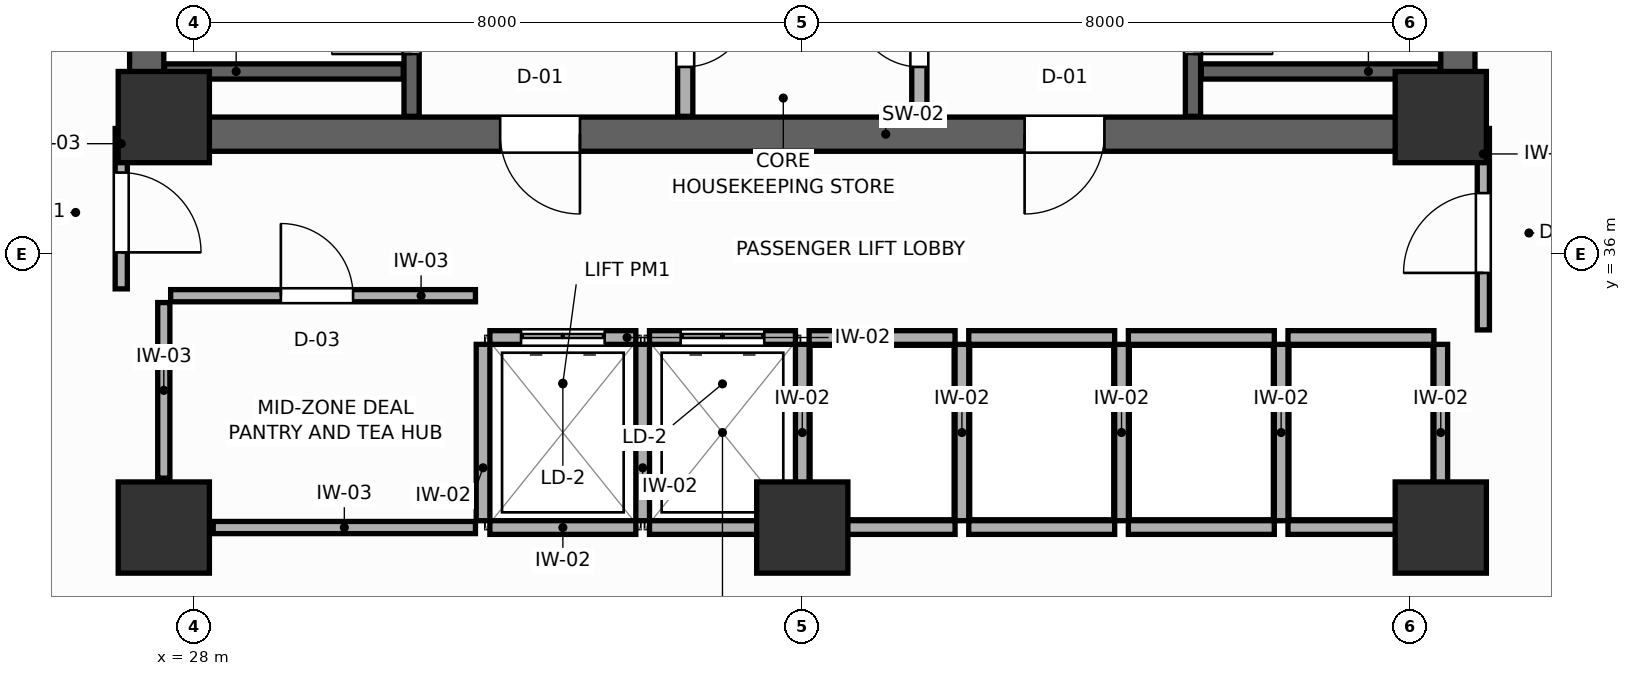
"""IFC4 building model, lengths in metres.
Left out: names, types, materials, properties, quantities, classifications, styles, units other than length and angle.
Written with IfcOpenShell. Run it as: python <this file> out.ifc"""

import sys

from ifc_helpers import new_model, si_unit, direction, frame, frame_2d, origin, origin_2d, place, context, subcontext, project, spatial, rectangle, extrude, source, transform, mapped, element, fill, save


model = new_model("IFC4")
c1 = context("Model", 3, precision=1e-05, world=origin(), true_north=direction((0.0, 1.0)))
c2 = subcontext(c1, "Body", "Model", "MODEL_VIEW")
j1 = project(units=[si_unit("LENGTHUNIT", "METRE"), si_unit("PLANEANGLEUNIT", "RADIAN")], contexts=[c1])
p1 = place(None, origin())
s1 = spatial("IfcSite", under=j1, at=p1, CompositionType="ELEMENT")
p2 = place(p1, origin())
s2 = spatial("IfcBuilding", under=s1, at=p2, CompositionType="ELEMENT")
p3 = place(p2, frame((0.0, 0.0, 143.4)))
s3 = spatial("IfcBuildingStorey", under=s2, at=p3, CompositionType="ELEMENT", Elevation=143.4)
p4 = place(p3, frame((27.15, 37.575, 0.0), z_axis=(0.0, 0.0, 1.0), x_axis=(1.0, 0.0, 0.0)))
e1 = element("IfcWall", 1, at=p4, inside=s3, PredefinedType="SHEAR", context=c2, shape_type="SweptSolid", body=[
    extrude(rectangle(XDim=17.7, YDim=0.45, at=frame_2d((8.85, 0.0))), origin(), (0.0, 0.0, 1.0), 3.6),
])
p5 = place(p4, frame((4.875, 0.0, 0.0)))
e2 = element("IfcOpeningElement", 2, at=p5, cuts=e1, PredefinedType="OPENING", context=c2, shape_type="SweptSolid", body=[
    extrude(rectangle(XDim=1.05, YDim=2.1, at=frame_2d((0.525, 1.05))), frame((0.0, 0.235, 0.0), z_axis=(0.0, -1.0, 0.0), x_axis=(1.0, 0.0, 0.0)), (0.0, 0.0, 1.0), 0.47),
])
p6 = place(p4, frame((11.775, 0.0, 0.0)))
e3 = element("IfcOpeningElement", 3, at=p6, cuts=e1, PredefinedType="OPENING", context=c2, shape_type="SweptSolid", body=[
    extrude(rectangle(XDim=1.05, YDim=2.1, at=frame_2d((0.525, 1.05))), frame((0.0, 0.235, 0.0), z_axis=(0.0, -1.0, 0.0), x_axis=(1.0, 0.0, 0.0)), (0.0, 0.0, 1.0), 0.47),
])
for number, where, z_axis, x_axis in (
    (4, (27.375, 37.8, 0.0), (0.0, 0.0, 1.0), (0.0, 1.0, 0.0)),
    (5, (44.625, 37.8, 0.0), (0.0, 0.0, 1.0), (0.0, 1.0, 0.0)),
):
    element("IfcWall", number, at=place(p3, frame(where, z_axis=z_axis, x_axis=x_axis)), inside=s3, PredefinedType="SHEAR", context=c2, shape_type="SweptSolid", body=[
        extrude(rectangle(XDim=9.0, YDim=0.45, at=frame_2d((4.5, 0.0))), origin(), (0.0, 0.0, 1.0), 3.6),
    ])
m1 = source(origin(), c2, "Body", "SweptSolid", [
    extrude(rectangle(XDim=1.2, YDim=1.2, at=origin_2d()), origin(), (0.0, 0.0, 1.0), 3.6),
])
for number, where, z_axis, x_axis in (
    (6, (27.6, 37.8, 0.0), (0.0, 0.0, 1.0), (1.0, 0.0, 0.0)),
    (7, (44.4, 37.8, 0.0), (0.0, 0.0, 1.0), (1.0, 0.0, 0.0)),
    (8, (27.6, 32.4, 0.0), (0.0, 0.0, 1.0), (1.0, 0.0, 0.0)),
    (9, (44.4, 32.4, 0.0), (0.0, 0.0, 1.0), (1.0, 0.0, 0.0)),
    (10, (36.0, 32.4, 0.0), (0.0, 0.0, 1.0), (1.0, 0.0, 0.0)),
):
    element("IfcColumn", number, at=place(p3, frame(where, z_axis=z_axis, x_axis=x_axis)), inside=s3, PredefinedType="COLUMN", context=c2, shape_type="MappedRepresentation", body=[
        mapped(m1, transform((0.0, 0.0, 0.0), scale=1.0)),
    ])
p7 = place(p3, frame((30.86, 37.81, 0.0), z_axis=(0.0, 0.0, 1.0), x_axis=(0.0, 1.0, 0.0)))
e11 = element("IfcWall", 11, at=p7, inside=s3, PredefinedType="SHEAR", context=c2, shape_type="SweptSolid", body=[
    extrude(rectangle(XDim=8.98, YDim=0.2, at=frame_2d((4.49, 0.0))), origin(), (0.0, 0.0, 1.0), 3.6),
])
p8 = place(p7, frame((0.82, 0.0, 0.0)))
e12 = element("IfcOpeningElement", 12, at=p8, cuts=e11, PredefinedType="OPENING", context=c2, shape_type="SweptSolid", body=[
    extrude(rectangle(XDim=1.05, YDim=2.1, at=frame_2d((0.525, 1.05))), frame((0.0, 0.11, 0.0), z_axis=(0.0, -1.0, 0.0), x_axis=(1.0, 0.0, 0.0)), (0.0, 0.0, 1.0), 0.22),
])
p9 = place(p3, frame((27.61, 38.4, 0.0), z_axis=(0.0, 0.0, 1.0), x_axis=(1.0, 0.0, 0.0)))
e13 = element("IfcWall", 13, at=p9, inside=s3, PredefinedType="SHEAR", context=c2, shape_type="SweptSolid", body=[
    extrude(rectangle(XDim=3.14, YDim=0.2, at=frame_2d((1.57, 0.0))), origin(), (0.0, 0.0, 1.0), 3.6),
])
p10 = place(p3, frame((41.14, 37.81, 0.0), z_axis=(0.0, 0.0, 1.0), x_axis=(0.0, 1.0, 0.0)))
e14 = element("IfcWall", 14, at=p10, inside=s3, PredefinedType="SHEAR", context=c2, shape_type="SweptSolid", body=[
    extrude(rectangle(XDim=8.98, YDim=0.2, at=frame_2d((4.49, 0.0))), origin(), (0.0, 0.0, 1.0), 3.6),
])
p11 = place(p10, frame((0.82, 0.0, 0.0)))
e15 = element("IfcOpeningElement", 15, at=p11, cuts=e14, PredefinedType="OPENING", context=c2, shape_type="SweptSolid", body=[
    extrude(rectangle(XDim=1.05, YDim=2.1, at=frame_2d((0.525, 1.05))), frame((0.0, 0.11, 0.0), z_axis=(0.0, -1.0, 0.0), x_axis=(1.0, 0.0, 0.0)), (0.0, 0.0, 1.0), 0.22),
])
p12 = place(p3, frame((41.25, 38.4, 0.0), z_axis=(0.0, 0.0, 1.0), x_axis=(1.0, 0.0, 0.0)))
e16 = element("IfcWall", 16, at=p12, inside=s3, PredefinedType="SHEAR", context=c2, shape_type="SweptSolid", body=[
    extrude(rectangle(XDim=3.14, YDim=0.2, at=frame_2d((1.57, 0.0))), origin(), (0.0, 0.0, 1.0), 3.6),
])
p13 = place(p3, frame((34.46, 37.81, 0.0), z_axis=(0.0, 0.0, 1.0), x_axis=(0.0, 1.0, 0.0)))
e17 = element("IfcWall", 17, at=p13, inside=s3, PredefinedType="PARTITIONING", context=c2, shape_type="SweptSolid", body=[
    extrude(rectangle(XDim=8.98, YDim=0.2, at=frame_2d((4.49, 0.0))), origin(), (0.0, 0.0, 1.0), 3.4),
])
p14 = place(p13, frame((0.65, 0.0, 0.0)))
e18 = element("IfcOpeningElement", 18, at=p14, cuts=e17, PredefinedType="OPENING", context=c2, shape_type="SweptSolid", body=[
    extrude(rectangle(XDim=0.85, YDim=2.05, at=frame_2d((0.425, 1.025))), frame((0.0, 0.11, 0.0), z_axis=(0.0, -1.0, 0.0), x_axis=(1.0, 0.0, 0.0)), (0.0, 0.0, 1.0), 0.22),
])
p15 = place(p3, frame((37.54, 37.81, 0.0), z_axis=(0.0, 0.0, 1.0), x_axis=(0.0, 1.0, 0.0)))
e19 = element("IfcWall", 19, at=p15, inside=s3, PredefinedType="PARTITIONING", context=c2, shape_type="SweptSolid", body=[
    extrude(rectangle(XDim=8.98, YDim=0.2, at=frame_2d((4.49, 0.0))), origin(), (0.0, 0.0, 1.0), 3.4),
])
p16 = place(p15, frame((0.65, 0.0, 0.0)))
e20 = element("IfcOpeningElement", 20, at=p16, cuts=e19, PredefinedType="OPENING", context=c2, shape_type="SweptSolid", body=[
    extrude(rectangle(XDim=0.85, YDim=2.05, at=frame_2d((0.425, 1.025))), frame((0.0, 0.11, 0.0), z_axis=(0.0, -1.0, 0.0), x_axis=(1.0, 0.0, 0.0)), (0.0, 0.0, 1.0), 0.22),
])
p17 = place(p3, frame((31.89, 34.9, 0.0), z_axis=(0.0, 0.0, 1.0), x_axis=(1.0, 0.0, 0.0)))
e21 = element("IfcWall", 21, at=p17, inside=s3, PredefinedType="PARTITIONING", context=c2, shape_type="SweptSolid", body=[
    extrude(rectangle(XDim=1.92, YDim=0.18, at=frame_2d((0.96, 0.0))), origin(), (0.0, 0.0, 1.0), 3.4),
])
p18 = place(p17, frame((0.41, 0.0, 0.0)))
e22 = element("IfcOpeningElement", 22, at=p18, cuts=e21, PredefinedType="OPENING", context=c2, shape_type="SweptSolid", body=[
    extrude(rectangle(XDim=1.1, YDim=2.1, at=frame_2d((0.55, 1.05))), frame((0.0, 0.1, 0.0), z_axis=(0.0, -1.0, 0.0), x_axis=(1.0, 0.0, 0.0)), (0.0, 0.0, 1.0), 0.2),
])
p19 = place(p3, frame((31.89, 32.4, 0.0), z_axis=(0.0, 0.0, 1.0), x_axis=(1.0, 0.0, 0.0)))
e23 = element("IfcWall", 23, at=p19, inside=s3, PredefinedType="PARTITIONING", context=c2, shape_type="SweptSolid", body=[
    extrude(rectangle(XDim=1.92, YDim=0.18, at=frame_2d((0.96, 0.0))), origin(), (0.0, 0.0, 1.0), 2.16),
])
p20 = place(p3, frame((31.8, 32.49, 0.0), z_axis=(0.0, 0.0, 1.0), x_axis=(0.0, 1.0, 0.0)))
e24 = element("IfcWall", 24, at=p20, inside=s3, PredefinedType="PARTITIONING", context=c2, shape_type="SweptSolid", body=[
    extrude(rectangle(XDim=2.32, YDim=0.18, at=frame_2d((1.16, 0.0))), origin(), (0.0, 0.0, 1.0), 3.4),
])
p21 = place(p3, frame((33.99, 34.9, 0.0), z_axis=(0.0, 0.0, 1.0), x_axis=(1.0, 0.0, 0.0)))
e25 = element("IfcWall", 25, at=p21, inside=s3, PredefinedType="PARTITIONING", context=c2, shape_type="SweptSolid", body=[
    extrude(rectangle(XDim=1.92, YDim=0.18, at=frame_2d((0.96, 0.0))), origin(), (0.0, 0.0, 1.0), 3.4),
])
p22 = place(p21, frame((0.41, 0.0, 0.0)))
e26 = element("IfcOpeningElement", 26, at=p22, cuts=e25, PredefinedType="OPENING", context=c2, shape_type="SweptSolid", body=[
    extrude(rectangle(XDim=1.1, YDim=2.1, at=frame_2d((0.55, 1.05))), frame((0.0, 0.1, 0.0), z_axis=(0.0, -1.0, 0.0), x_axis=(1.0, 0.0, 0.0)), (0.0, 0.0, 1.0), 0.2),
])
p23 = place(p3, frame((33.99, 32.4, 0.0), z_axis=(0.0, 0.0, 1.0), x_axis=(1.0, 0.0, 0.0)))
e27 = element("IfcWall", 27, at=p23, inside=s3, PredefinedType="PARTITIONING", context=c2, shape_type="SweptSolid", body=[
    extrude(rectangle(XDim=1.92, YDim=0.18, at=frame_2d((0.96, 0.0))), origin(), (0.0, 0.0, 1.0), 2.16),
])
p24 = place(p3, frame((33.9, 32.49, 0.0), z_axis=(0.0, 0.0, 1.0), x_axis=(0.0, 1.0, 0.0)))
e28 = element("IfcWall", 28, at=p24, inside=s3, PredefinedType="PARTITIONING", context=c2, shape_type="SweptSolid", body=[
    extrude(rectangle(XDim=2.32, YDim=0.18, at=frame_2d((1.16, 0.0))), origin(), (0.0, 0.0, 1.0), 3.4),
])
p25 = place(p3, frame((36.09, 34.9, 0.0), z_axis=(0.0, 0.0, 1.0), x_axis=(1.0, 0.0, 0.0)))
e29 = element("IfcWall", 29, at=p25, inside=s3, PredefinedType="PARTITIONING", context=c2, shape_type="SweptSolid", body=[
    extrude(rectangle(XDim=1.92, YDim=0.18, at=frame_2d((0.96, 0.0))), origin(), (0.0, 0.0, 1.0), 3.4),
])
p26 = place(p3, frame((36.09, 32.4, 0.0), z_axis=(0.0, 0.0, 1.0), x_axis=(1.0, 0.0, 0.0)))
e30 = element("IfcWall", 30, at=p26, inside=s3, PredefinedType="PARTITIONING", context=c2, shape_type="SweptSolid", body=[
    extrude(rectangle(XDim=1.92, YDim=0.18, at=frame_2d((0.96, 0.0))), origin(), (0.0, 0.0, 1.0), 2.16),
])
p27 = place(p3, frame((36.0, 32.49, 0.0), z_axis=(0.0, 0.0, 1.0), x_axis=(0.0, 1.0, 0.0)))
e31 = element("IfcWall", 31, at=p27, inside=s3, PredefinedType="PARTITIONING", context=c2, shape_type="SweptSolid", body=[
    extrude(rectangle(XDim=2.32, YDim=0.18, at=frame_2d((1.16, 0.0))), origin(), (0.0, 0.0, 1.0), 3.4),
])
p28 = place(p3, frame((38.19, 34.9, 0.0), z_axis=(0.0, 0.0, 1.0), x_axis=(1.0, 0.0, 0.0)))
e32 = element("IfcWall", 32, at=p28, inside=s3, PredefinedType="PARTITIONING", context=c2, shape_type="SweptSolid", body=[
    extrude(rectangle(XDim=1.92, YDim=0.18, at=frame_2d((0.96, 0.0))), origin(), (0.0, 0.0, 1.0), 3.4),
])
p29 = place(p3, frame((38.19, 32.4, 0.0), z_axis=(0.0, 0.0, 1.0), x_axis=(1.0, 0.0, 0.0)))
e33 = element("IfcWall", 33, at=p29, inside=s3, PredefinedType="PARTITIONING", context=c2, shape_type="SweptSolid", body=[
    extrude(rectangle(XDim=1.92, YDim=0.18, at=frame_2d((0.96, 0.0))), origin(), (0.0, 0.0, 1.0), 2.16),
])
p30 = place(p3, frame((38.1, 32.49, 0.0), z_axis=(0.0, 0.0, 1.0), x_axis=(0.0, 1.0, 0.0)))
e34 = element("IfcWall", 34, at=p30, inside=s3, PredefinedType="PARTITIONING", context=c2, shape_type="SweptSolid", body=[
    extrude(rectangle(XDim=2.32, YDim=0.18, at=frame_2d((1.16, 0.0))), origin(), (0.0, 0.0, 1.0), 3.4),
])
p31 = place(p3, frame((40.29, 34.9, 0.0), z_axis=(0.0, 0.0, 1.0), x_axis=(1.0, 0.0, 0.0)))
e35 = element("IfcWall", 35, at=p31, inside=s3, PredefinedType="PARTITIONING", context=c2, shape_type="SweptSolid", body=[
    extrude(rectangle(XDim=1.92, YDim=0.18, at=frame_2d((0.96, 0.0))), origin(), (0.0, 0.0, 1.0), 3.4),
])
p32 = place(p3, frame((40.29, 32.4, 0.0), z_axis=(0.0, 0.0, 1.0), x_axis=(1.0, 0.0, 0.0)))
e36 = element("IfcWall", 36, at=p32, inside=s3, PredefinedType="PARTITIONING", context=c2, shape_type="SweptSolid", body=[
    extrude(rectangle(XDim=1.92, YDim=0.18, at=frame_2d((0.96, 0.0))), origin(), (0.0, 0.0, 1.0), 2.16),
])
p33 = place(p3, frame((40.2, 32.49, 0.0), z_axis=(0.0, 0.0, 1.0), x_axis=(0.0, 1.0, 0.0)))
e37 = element("IfcWall", 37, at=p33, inside=s3, PredefinedType="PARTITIONING", context=c2, shape_type="SweptSolid", body=[
    extrude(rectangle(XDim=2.32, YDim=0.18, at=frame_2d((1.16, 0.0))), origin(), (0.0, 0.0, 1.0), 3.4),
])
p34 = place(p3, frame((42.39, 34.9, 0.0), z_axis=(0.0, 0.0, 1.0), x_axis=(1.0, 0.0, 0.0)))
e38 = element("IfcWall", 38, at=p34, inside=s3, PredefinedType="PARTITIONING", context=c2, shape_type="SweptSolid", body=[
    extrude(rectangle(XDim=1.92, YDim=0.18, at=frame_2d((0.96, 0.0))), origin(), (0.0, 0.0, 1.0), 3.4),
])
p35 = place(p3, frame((42.39, 32.4, 0.0), z_axis=(0.0, 0.0, 1.0), x_axis=(1.0, 0.0, 0.0)))
e39 = element("IfcWall", 39, at=p35, inside=s3, PredefinedType="PARTITIONING", context=c2, shape_type="SweptSolid", body=[
    extrude(rectangle(XDim=1.92, YDim=0.18, at=frame_2d((0.96, 0.0))), origin(), (0.0, 0.0, 1.0), 2.16),
])
for number, where, z_axis, x_axis in (
    (40, (42.3, 32.49, 0.0), (0.0, 0.0, 1.0), (0.0, 1.0, 0.0)),
    (41, (44.4, 32.49, 0.0), (0.0, 0.0, 1.0), (0.0, 1.0, 0.0)),
):
    element("IfcWall", number, at=place(p3, frame(where, z_axis=z_axis, x_axis=x_axis)), inside=s3, PredefinedType="PARTITIONING", context=c2, shape_type="SweptSolid", body=[
        extrude(rectangle(XDim=2.32, YDim=0.18, at=frame_2d((1.16, 0.0))), origin(), (0.0, 0.0, 1.0), 3.4),
    ])
p36 = place(p3, frame((28.25, 32.4, 0.0), z_axis=(0.0, 0.0, 1.0), x_axis=(1.0, 0.0, 0.0)))
e42 = element("IfcWall", 42, at=p36, inside=s3, PredefinedType="PARTITIONING", context=c2, shape_type="SweptSolid", body=[
    extrude(rectangle(XDim=3.45, YDim=0.16, at=frame_2d((1.725, 0.0))), origin(), (0.0, 0.0, 1.0), 2.16),
])
p37 = place(p3, frame((27.6, 33.05, 0.0), z_axis=(0.0, 0.0, 1.0), x_axis=(0.0, 1.0, 0.0)))
e43 = element("IfcWall", 43, at=p37, inside=s3, PredefinedType="PARTITIONING", context=c2, shape_type="SweptSolid", body=[
    extrude(rectangle(XDim=2.31, YDim=0.16, at=frame_2d((1.155, 0.0))), origin(), (0.0, 0.0, 1.0), 3.4),
])
p38 = place(p3, frame((27.69, 35.45, 0.0), z_axis=(0.0, 0.0, 1.0), x_axis=(1.0, 0.0, 0.0)))
e44 = element("IfcWall", 44, at=p38, inside=s3, PredefinedType="PARTITIONING", context=c2, shape_type="SweptSolid", body=[
    extrude(rectangle(XDim=4.01, YDim=0.16, at=frame_2d((2.005, 0.0))), origin(), (0.0, 0.0, 1.0), 3.4),
])
p39 = place(p38, frame((1.45, 0.0, 0.0)))
e45 = element("IfcOpeningElement", 45, at=p39, cuts=e44, PredefinedType="OPENING", context=c2, shape_type="SweptSolid", body=[
    extrude(rectangle(XDim=0.95, YDim=2.05, at=frame_2d((0.475, 1.025))), frame((0.0, 0.09, 0.0), z_axis=(0.0, -1.0, 0.0), x_axis=(1.0, 0.0, 0.0)), (0.0, 0.0, 1.0), 0.18),
])
p40 = place(p3, frame((27.04, 35.54, 0.0), z_axis=(0.0, 0.0, 1.0), x_axis=(0.0, 1.0, 0.0)))
e46 = element("IfcWall", 46, at=p40, inside=s3, PredefinedType="PARTITIONING", context=c2, shape_type="SweptSolid", body=[
    extrude(rectangle(XDim=2.11, YDim=0.16, at=frame_2d((1.055, 0.0))), origin(), (0.0, 0.0, 1.0), 3.4),
])
p41 = place(p40, frame((0.48, 0.0, 0.0)))
e47 = element("IfcOpeningElement", 47, at=p41, cuts=e46, PredefinedType="OPENING", context=c2, shape_type="SweptSolid", body=[
    extrude(rectangle(XDim=1.05, YDim=2.1, at=frame_2d((0.525, 1.05))), frame((0.0, 0.09, 0.0), z_axis=(0.0, -1.0, 0.0), x_axis=(1.0, 0.0, 0.0)), (0.0, 0.0, 1.0), 0.18),
])
p42 = place(p3, frame((44.96, 35.0, 0.0), z_axis=(0.0, 0.0, 1.0), x_axis=(0.0, 1.0, 0.0)))
e48 = element("IfcWall", 48, at=p42, inside=s3, PredefinedType="PARTITIONING", context=c2, shape_type="SweptSolid", body=[
    extrude(rectangle(XDim=2.65, YDim=0.16, at=frame_2d((1.325, 0.0))), origin(), (0.0, 0.0, 1.0), 3.4),
])
p43 = place(p42, frame((0.75, 0.0, 0.0)))
e49 = element("IfcOpeningElement", 49, at=p43, cuts=e48, PredefinedType="OPENING", context=c2, shape_type="SweptSolid", body=[
    extrude(rectangle(XDim=1.05, YDim=2.1, at=frame_2d((0.525, 1.05))), frame((0.0, 0.09, 0.0), z_axis=(0.0, -1.0, 0.0), x_axis=(1.0, 0.0, 0.0)), (0.0, 0.0, 1.0), 0.18),
])
p44 = place(p8, origin())
e50 = element("IfcDoor", 50, at=p44, inside=s3, OperationType="SINGLE_SWING_LEFT", PredefinedType="DOOR", context=c2, shape_type="SweptSolid", body=[
    extrude(rectangle(XDim=1.05, YDim=2.1, at=frame_2d((0.525, 1.05))), frame((0.0, 0.025, 0.0), z_axis=(0.0, -1.0, 0.0), x_axis=(1.0, 0.0, 0.0)), (0.0, 0.0, 1.0), 0.05),
])
fill(e12, e50)
p45 = place(p11, frame((1.05, 0.0, 0.0), z_axis=(0.0, 0.0, 1.0), x_axis=(-1.0, 0.0, 0.0)))
e51 = element("IfcDoor", 51, at=p45, inside=s3, OperationType="SINGLE_SWING_RIGHT", PredefinedType="DOOR", context=c2, shape_type="SweptSolid", body=[
    extrude(rectangle(XDim=1.05, YDim=2.1, at=frame_2d((0.525, 1.05))), frame((0.0, 0.025, 0.0), z_axis=(0.0, -1.0, 0.0), x_axis=(1.0, 0.0, 0.0)), (0.0, 0.0, 1.0), 0.05),
])
fill(e15, e51)
p46 = place(p14, frame((0.85, 0.0, 0.0), z_axis=(0.0, 0.0, 1.0), x_axis=(-1.0, 0.0, 0.0)))
e52 = element("IfcDoor", 52, at=p46, inside=s3, OperationType="SINGLE_SWING_LEFT", PredefinedType="DOOR", context=c2, shape_type="SweptSolid", body=[
    extrude(rectangle(XDim=0.85, YDim=2.05, at=frame_2d((0.425, 1.025))), frame((0.0, 0.025, 0.0), z_axis=(0.0, -1.0, 0.0), x_axis=(1.0, 0.0, 0.0)), (0.0, 0.0, 1.0), 0.05),
])
fill(e18, e52)
p47 = place(p16, origin())
e53 = element("IfcDoor", 53, at=p47, inside=s3, OperationType="SINGLE_SWING_RIGHT", PredefinedType="DOOR", context=c2, shape_type="SweptSolid", body=[
    extrude(rectangle(XDim=0.85, YDim=2.05, at=frame_2d((0.425, 1.025))), frame((0.0, 0.025, 0.0), z_axis=(0.0, -1.0, 0.0), x_axis=(1.0, 0.0, 0.0)), (0.0, 0.0, 1.0), 0.05),
])
fill(e20, e53)
p48 = place(p18, origin())
e54 = element("IfcDoor", 54, at=p48, inside=s3, OperationType="DOUBLE_DOOR_SLIDING", PredefinedType="DOOR", context=c2, shape_type="SweptSolid", body=[
    extrude(rectangle(XDim=1.1, YDim=2.1, at=frame_2d((0.55, 1.05))), frame((0.0, 0.025, 0.0), z_axis=(0.0, -1.0, 0.0), x_axis=(1.0, 0.0, 0.0)), (0.0, 0.0, 1.0), 0.05),
])
fill(e22, e54)
p49 = place(p22, origin())
e55 = element("IfcDoor", 55, at=p49, inside=s3, OperationType="DOUBLE_DOOR_SLIDING", PredefinedType="DOOR", context=c2, shape_type="SweptSolid", body=[
    extrude(rectangle(XDim=1.1, YDim=2.1, at=frame_2d((0.55, 1.05))), frame((0.0, 0.025, 0.0), z_axis=(0.0, -1.0, 0.0), x_axis=(1.0, 0.0, 0.0)), (0.0, 0.0, 1.0), 0.05),
])
fill(e26, e55)
p50 = place(p39, origin())
e56 = element("IfcDoor", 56, at=p50, inside=s3, OperationType="SINGLE_SWING_LEFT", PredefinedType="DOOR", context=c2, shape_type="SweptSolid", body=[
    extrude(rectangle(XDim=0.95, YDim=2.05, at=frame_2d((0.475, 1.025))), frame((0.0, 0.025, 0.0), z_axis=(0.0, -1.0, 0.0), x_axis=(1.0, 0.0, 0.0)), (0.0, 0.0, 1.0), 0.05),
])
fill(e45, e56)
p51 = place(p41, frame((1.05, 0.0, 0.0), z_axis=(0.0, 0.0, 1.0), x_axis=(-1.0, 0.0, 0.0)))
e57 = element("IfcDoor", 57, at=p51, inside=s3, OperationType="SINGLE_SWING_RIGHT", PredefinedType="DOOR", context=c2, shape_type="SweptSolid", body=[
    extrude(rectangle(XDim=1.05, YDim=2.1, at=frame_2d((0.525, 1.05))), frame((0.0, 0.025, 0.0), z_axis=(0.0, -1.0, 0.0), x_axis=(1.0, 0.0, 0.0)), (0.0, 0.0, 1.0), 0.05),
])
fill(e47, e57)
p52 = place(p43, origin())
e58 = element("IfcDoor", 58, at=p52, inside=s3, OperationType="SINGLE_SWING_LEFT", PredefinedType="DOOR", context=c2, shape_type="SweptSolid", body=[
    extrude(rectangle(XDim=1.05, YDim=2.1, at=frame_2d((0.525, 1.05))), frame((0.0, 0.025, 0.0), z_axis=(0.0, -1.0, 0.0), x_axis=(1.0, 0.0, 0.0)), (0.0, 0.0, 1.0), 0.05),
])
fill(e49, e58)
p53 = place(p5, frame((1.05, 0.0, 0.0), z_axis=(0.0, 0.0, 1.0), x_axis=(-1.0, 0.0, 0.0)))
e59 = element("IfcDoor", 59, at=p53, inside=s3, OperationType="SINGLE_SWING_LEFT", PredefinedType="DOOR", context=c2, shape_type="SweptSolid", body=[
    extrude(rectangle(XDim=1.05, YDim=2.1, at=frame_2d((0.525, 1.05))), frame((0.0, 0.025, 0.0), z_axis=(0.0, -1.0, 0.0), x_axis=(1.0, 0.0, 0.0)), (0.0, 0.0, 1.0), 0.05),
])
fill(e2, e59)
p54 = place(p6, frame((1.05, 0.0, 0.0), z_axis=(0.0, 0.0, 1.0), x_axis=(-1.0, 0.0, 0.0)))
e60 = element("IfcDoor", 60, at=p54, inside=s3, OperationType="SINGLE_SWING_RIGHT", PredefinedType="DOOR", context=c2, shape_type="SweptSolid", body=[
    extrude(rectangle(XDim=1.05, YDim=2.1, at=frame_2d((0.525, 1.05))), frame((0.0, 0.025, 0.0), z_axis=(0.0, -1.0, 0.0), x_axis=(1.0, 0.0, 0.0)), (0.0, 0.0, 1.0), 0.05),
])
fill(e3, e60)
save(model, sys.argv[1])
